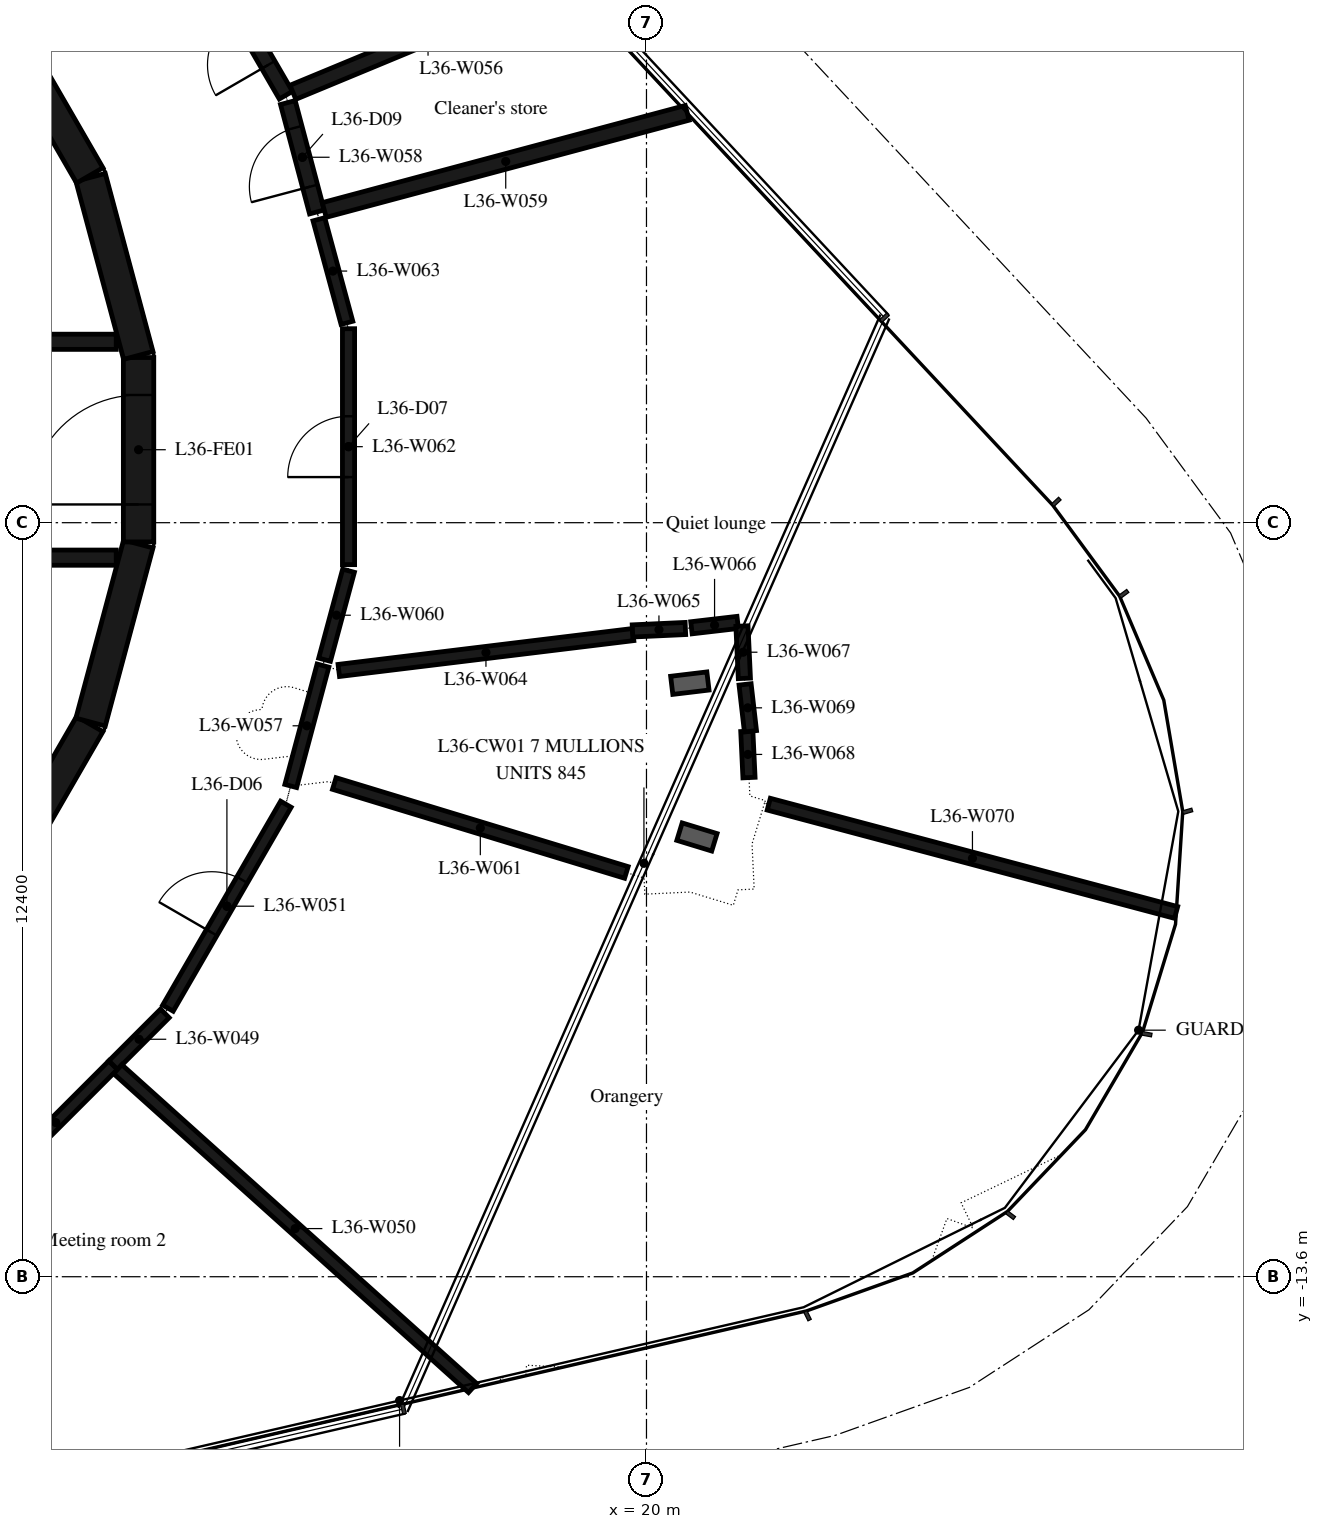
"""IFC4 building model, lengths in metres.
Left out: names, types, materials, properties, quantities, classifications, styles, units other than length and angle.
Written with IfcOpenShell. Run it as: python <this file> out.ifc"""

import sys

from ifc_helpers import new_model, si_unit, direction, frame, frame_2d, origin, place, context, subcontext, project, spatial, rectangle, extrude, element, fill, save


model = new_model("IFC4")
c1 = context("Model", 3, precision=1e-05, world=origin(), true_north=direction((0.0, 1.0)))
c2 = subcontext(c1, "Body", "Model", "MODEL_VIEW")
j1 = project(units=[si_unit("LENGTHUNIT", "METRE"), si_unit("PLANEANGLEUNIT", "RADIAN")], contexts=[c1])
p1 = place(None, origin())
s1 = spatial("IfcSite", under=j1, at=p1, CompositionType="ELEMENT")
p2 = place(p1, origin())
s2 = spatial("IfcBuilding", under=s1, at=p2, CompositionType="ELEMENT")
p3 = place(p2, frame((0.0, 0.0, 144.9)))
s3 = spatial("IfcBuildingStorey", under=s2, at=p3, CompositionType="ELEMENT", Elevation=144.9)
for number, where, z_axis, x_axis in (
    (1, (9.329, -7.137, 0.0), (0.0, 0.0, 1.0), (0.5, 0.866, 0.0)),
    (2, (10.858, -4.479, 0.0), (0.0, 0.0, 1.0), (0.259, 0.966, 0.0)),
):
    element("IfcWall", number, at=place(p3, frame(where, z_axis=z_axis, x_axis=x_axis)), inside=s3, PredefinedType="SHEAR", context=c2, shape_type="SweptSolid", body=[
        extrude(rectangle(XDim=3.033, YDim=0.5, at=frame_2d((1.516, 0.0))), origin(), (0.0, 0.0, 1.0), 6.35),
    ])
p4 = place(p3, frame((11.647, -1.516, 0.0), z_axis=(0.0, 0.0, 1.0), x_axis=(0.0, 1.0, 0.0)))
e3 = element("IfcWall", 3, at=p4, inside=s3, PredefinedType="SHEAR", context=c2, shape_type="SweptSolid", body=[
    extrude(rectangle(XDim=3.033, YDim=0.5, at=frame_2d((1.516, 0.0))), origin(), (0.0, 0.0, 1.0), 6.35),
])
p5 = place(p4, frame((0.616, 0.0, 0.0)))
e4 = element("IfcOpeningElement", 4, at=p5, cuts=e3, PredefinedType="OPENING", context=c2, shape_type="SweptSolid", body=[
    extrude(rectangle(XDim=1.8, YDim=2.1, at=frame_2d((0.9, 1.05))), frame((0.0, 0.26, 0.0), z_axis=(0.0, -1.0, 0.0), x_axis=(1.0, 0.0, 0.0)), (0.0, 0.0, 1.0), 0.52),
])
for number, where, z_axis, x_axis in (
    (5, (11.643, 1.55, 0.0), (0.0, 0.0, 1.0), (-0.259, 0.966, 0.0)),
    (6, (10.845, 4.51, 0.0), (0.0, 0.0, 1.0), (-0.5, 0.866, 0.0)),
):
    element("IfcWall", number, at=place(p3, frame(where, z_axis=z_axis, x_axis=x_axis)), inside=s3, PredefinedType="SHEAR", context=c2, shape_type="SweptSolid", body=[
        extrude(rectangle(XDim=3.033, YDim=0.5, at=frame_2d((1.516, 0.0))), origin(), (0.0, 0.0, 1.0), 6.35),
    ])
p6 = place(p3, frame((3.35, 1.775, 0.0), z_axis=(0.0, 0.0, 1.0), x_axis=(1.0, 0.0, 0.0)))
e7 = element("IfcWall", 7, at=p6, inside=s3, PredefinedType="SHEAR", context=c2, shape_type="SweptSolid", body=[
    extrude(rectangle(XDim=7.93, YDim=0.25, at=frame_2d((3.965, 0.0))), origin(), (0.0, 0.0, 1.0), 6.35),
])
p7 = place(p6, frame((0.35, 0.0, 0.0)))
e8 = element("IfcOpeningElement", 8, at=p7, cuts=e7, PredefinedType="OPENING", context=c2, shape_type="SweptSolid", body=[
    extrude(rectangle(XDim=1.2, YDim=2.4, at=frame_2d((0.6, 1.2))), frame((0.0, 0.135, 0.0), z_axis=(0.0, -1.0, 0.0), x_axis=(1.0, 0.0, 0.0)), (0.0, 0.0, 1.0), 0.27),
])
p8 = place(p6, frame((2.5, 0.0, 0.0)))
e9 = element("IfcOpeningElement", 9, at=p8, cuts=e7, PredefinedType="OPENING", context=c2, shape_type="SweptSolid", body=[
    extrude(rectangle(XDim=1.2, YDim=2.4, at=frame_2d((0.6, 1.2))), frame((0.0, 0.135, 0.0), z_axis=(0.0, -1.0, 0.0), x_axis=(1.0, 0.0, 0.0)), (0.0, 0.0, 1.0), 0.27),
])
p9 = place(p6, frame((4.8, 0.0, 0.0)))
e10 = element("IfcOpeningElement", 10, at=p9, cuts=e7, PredefinedType="OPENING", context=c2, shape_type="SweptSolid", body=[
    extrude(rectangle(XDim=0.9, YDim=2.1, at=frame_2d((0.45, 1.05))), frame((0.0, 0.135, 0.0), z_axis=(0.0, -1.0, 0.0), x_axis=(1.0, 0.0, 0.0)), (0.0, 0.0, 1.0), 0.27),
])
p10 = place(p3, frame((3.35, -1.775, 0.0), z_axis=(0.0, 0.0, 1.0), x_axis=(1.0, 0.0, 0.0)))
e11 = element("IfcWall", 11, at=p10, inside=s3, PredefinedType="SHEAR", context=c2, shape_type="SweptSolid", body=[
    extrude(rectangle(XDim=7.93, YDim=0.25, at=frame_2d((3.965, 0.0))), origin(), (0.0, 0.0, 1.0), 6.35),
])
p11 = place(p10, frame((0.4, 0.0, 0.0)))
e12 = element("IfcOpeningElement", 12, at=p11, cuts=e11, PredefinedType="OPENING", context=c2, shape_type="SweptSolid", body=[
    extrude(rectangle(XDim=1.1, YDim=2.4, at=frame_2d((0.55, 1.2))), frame((0.0, 0.135, 0.0), z_axis=(0.0, -1.0, 0.0), x_axis=(1.0, 0.0, 0.0)), (0.0, 0.0, 1.0), 0.27),
])
p12 = place(p10, frame((2.55, 0.0, 0.0)))
e13 = element("IfcOpeningElement", 13, at=p12, cuts=e11, PredefinedType="OPENING", context=c2, shape_type="SweptSolid", body=[
    extrude(rectangle(XDim=1.1, YDim=2.4, at=frame_2d((0.55, 1.2))), frame((0.0, 0.135, 0.0), z_axis=(0.0, -1.0, 0.0), x_axis=(1.0, 0.0, 0.0)), (0.0, 0.0, 1.0), 0.27),
])
p13 = place(p10, frame((4.7, 0.0, 0.0)))
e14 = element("IfcOpeningElement", 14, at=p13, cuts=e11, PredefinedType="OPENING", context=c2, shape_type="SweptSolid", body=[
    extrude(rectangle(XDim=1.1, YDim=2.4, at=frame_2d((0.55, 1.2))), frame((0.0, 0.135, 0.0), z_axis=(0.0, -1.0, 0.0), x_axis=(1.0, 0.0, 0.0)), (0.0, 0.0, 1.0), 0.27),
])
p14 = place(p3, frame((9.341, -12.009, 0.0), z_axis=(0.0, 0.0, 1.0), x_axis=(0.707106781187, 0.707106781187, 0.0)))
e15 = element("IfcWall", 15, at=p14, inside=s3, PredefinedType="PARTITIONING", context=c2, shape_type="SweptSolid", body=[
    extrude(rectangle(XDim=2.672, YDim=0.2, at=frame_2d((1.336, 0.0))), origin(), (0.0, 0.0, 1.0), 6.35),
])
p15 = place(p3, frame((11.23, -10.12, 0.0), z_axis=(0.0, 0.0, 1.0), x_axis=(0.707106781187, 0.707106781187, 0.0)))
e16 = element("IfcWall", 16, at=p15, inside=s3, PredefinedType="PARTITIONING", context=c2, shape_type="SweptSolid", body=[
    extrude(rectangle(XDim=1.202, YDim=0.2, at=frame_2d((0.601, 0.0))), origin(), (0.0, 0.0, 1.0), 6.35),
])
p16 = place(p3, frame((11.304, -10.187, 0.0), z_axis=(0.0, 0.0, 1.0), x_axis=(0.743847874898, -0.668348964995, 0.0)))
e17 = element("IfcWall", 17, at=p16, inside=s3, PredefinedType="PARTITIONING", context=c2, shape_type="SweptSolid", body=[
    extrude(rectangle(XDim=7.845, YDim=0.2, at=frame_2d((3.922, 0.0))), origin(), (0.0, 0.0, 1.0), 6.35),
])
p17 = place(p3, frame((12.13, -9.183, 0.0), z_axis=(0.0, 0.0, 1.0), x_axis=(0.500760497952, 0.865585884642, 0.0)))
e18 = element("IfcWall", 18, at=p17, inside=s3, PredefinedType="PARTITIONING", context=c2, shape_type="SweptSolid", body=[
    extrude(rectangle(XDim=3.874, YDim=0.2, at=frame_2d((1.937, 0.0))), origin(), (0.0, 0.0, 1.0), 6.35),
])
p18 = place(p17, frame((1.437, 0.0, 0.0)))
e19 = element("IfcOpeningElement", 19, at=p18, cuts=e18, PredefinedType="OPENING", context=c2, shape_type="SweptSolid", body=[
    extrude(rectangle(XDim=1.0, YDim=2.1, at=frame_2d((0.5, 1.05))), frame((0.0, 0.11, 0.0), z_axis=(0.0, -1.0, 0.0), x_axis=(1.0, 0.0, 0.0)), (0.0, 0.0, 1.0), 0.22),
])
p19 = place(p3, frame((14.07, 5.83, 0.0), z_axis=(0.0, 0.0, 1.0), x_axis=(-0.501416067615, 0.865206291666, 0.0)))
e20 = element("IfcWall", 20, at=p19, inside=s3, PredefinedType="PARTITIONING", context=c2, shape_type="SweptSolid", body=[
    extrude(rectangle(XDim=2.154, YDim=0.25, at=frame_2d((1.077, 0.0))), origin(), (0.0, 0.0, 1.0), 6.35),
])
p20 = place(p19, frame((0.577, 0.0, 0.0)))
e21 = element("IfcOpeningElement", 21, at=p20, cuts=e20, PredefinedType="OPENING", context=c2, shape_type="SweptSolid", body=[
    extrude(rectangle(XDim=1.0, YDim=2.1, at=frame_2d((0.5, 1.05))), frame((0.0, 0.135, 0.0), z_axis=(0.0, -1.0, 0.0), x_axis=(1.0, 0.0, 0.0)), (0.0, 0.0, 1.0), 0.27),
])
p21 = place(p3, frame((14.186, 5.878, 0.0), z_axis=(0.0, 0.0, 1.0), x_axis=(0.923795968244, 0.382885112085, 0.0)))
e22 = element("IfcWall", 22, at=p21, inside=s3, PredefinedType="PARTITIONING", context=c2, shape_type="SweptSolid", body=[
    extrude(rectangle(XDim=4.811, YDim=0.25, at=frame_2d((2.406, 0.0))), origin(), (0.0, 0.0, 1.0), 6.35),
])
p22 = place(p3, frame((14.15, -5.53, 0.0), z_axis=(0.0, 0.0, 1.0), x_axis=(0.258589222806, 0.965987377686, 0.0)))
e23 = element("IfcWall", 23, at=p22, inside=s3, PredefinedType="PARTITIONING", context=c2, shape_type="SweptSolid", body=[
    extrude(rectangle(XDim=2.05, YDim=0.2, at=frame_2d((1.025, 0.0))), origin(), (0.0, 0.0, 1.0), 6.35),
])
p23 = place(p3, frame((14.58, 3.91, 0.0), z_axis=(0.0, 0.0, 1.0), x_axis=(-0.256764718734, 0.966473941301, 0.0)))
e24 = element("IfcWall", 24, at=p23, inside=s3, PredefinedType="PARTITIONING", context=c2, shape_type="SweptSolid", body=[
    extrude(rectangle(XDim=1.862, YDim=0.25, at=frame_2d((0.931, 0.0))), origin(), (0.0, 0.0, 1.0), 6.35),
])
p24 = place(p23, frame((0.431, 0.0, 0.0)))
e25 = element("IfcOpeningElement", 25, at=p24, cuts=e24, PredefinedType="OPENING", context=c2, shape_type="SweptSolid", body=[
    extrude(rectangle(XDim=1.0, YDim=2.1, at=frame_2d((0.5, 1.05))), frame((0.0, 0.135, 0.0), z_axis=(0.0, -1.0, 0.0), x_axis=(1.0, 0.0, 0.0)), (0.0, 0.0, 1.0), 0.27),
])
p25 = place(p3, frame((14.701, 3.942, 0.0), z_axis=(0.0, 0.0, 1.0), x_axis=(0.965998462852, 0.258547809444, 0.0)))
e26 = element("IfcWall", 26, at=p25, inside=s3, PredefinedType="PARTITIONING", context=c2, shape_type="SweptSolid", body=[
    extrude(rectangle(XDim=6.179, YDim=0.25, at=frame_2d((3.09, 0.0))), origin(), (0.0, 0.0, 1.0), 6.35),
])
p26 = place(p3, frame((14.706, -3.453, 0.0), z_axis=(0.0, 0.0, 1.0), x_axis=(0.260008136588, 0.96560642547, 0.0)))
e27 = element("IfcWall", 27, at=p26, inside=s3, PredefinedType="PARTITIONING", context=c2, shape_type="SweptSolid", body=[
    extrude(rectangle(XDim=1.515, YDim=0.2, at=frame_2d((0.758, 0.0))), origin(), (0.0, 0.0, 1.0), 6.35),
])
p27 = place(p3, frame((14.866, -5.489, 0.0), z_axis=(0.0, 0.0, 1.0), x_axis=(0.956637955258, -0.291279629495, 0.0)))
e28 = element("IfcWall", 28, at=p27, inside=s3, PredefinedType="PARTITIONING", context=c2, shape_type="SweptSolid", body=[
    extrude(rectangle(XDim=5.021, YDim=0.2, at=frame_2d((2.511, 0.0))), origin(), (0.0, 0.0, 1.0), 6.35),
])
p28 = place(p3, frame((15.1, -1.89, 0.0), z_axis=(0.0, 0.0, 1.0), x_axis=(0.0, 1.0, 0.0)))
e29 = element("IfcWall", 29, at=p28, inside=s3, PredefinedType="PARTITIONING", context=c2, shape_type="SweptSolid", body=[
    extrude(rectangle(XDim=3.88, YDim=0.2, at=frame_2d((1.94, 0.0))), origin(), (0.0, 0.0, 1.0), 6.35),
])
p29 = place(p28, frame((1.44, 0.0, 0.0)))
e30 = element("IfcOpeningElement", 30, at=p29, cuts=e29, PredefinedType="OPENING", context=c2, shape_type="SweptSolid", body=[
    extrude(rectangle(XDim=1.0, YDim=2.1, at=frame_2d((0.5, 1.05))), frame((0.0, 0.11, 0.0), z_axis=(0.0, -1.0, 0.0), x_axis=(1.0, 0.0, 0.0)), (0.0, 0.0, 1.0), 0.22),
])
p30 = place(p3, frame((15.074, 2.086, 0.0), z_axis=(0.0, 0.0, 1.0), x_axis=(-0.261407417774, 0.965228554247, 0.0)))
e31 = element("IfcWall", 31, at=p30, inside=s3, PredefinedType="PARTITIONING", context=c2, shape_type="SweptSolid", body=[
    extrude(rectangle(XDim=1.764, YDim=0.2, at=frame_2d((0.882, 0.0))), origin(), (0.0, 0.0, 1.0), 6.35),
])
p31 = place(p3, frame((19.78, -3.04, 0.0), z_axis=(0.0, 0.0, 1.0), x_axis=(-0.992655999792, -0.120971344035, 0.0)))
e32 = element("IfcWall", 32, at=p31, inside=s3, PredefinedType="PARTITIONING", context=c2, shape_type="SweptSolid", body=[
    extrude(rectangle(XDim=4.876, YDim=0.2, at=frame_2d((2.438, 0.0))), origin(), (0.0, 0.0, 1.0), 6.35),
])
p32 = place(p3, frame((20.64, -2.94, 0.0), z_axis=(0.0, 0.0, 1.0), x_axis=(-0.998942362986, -0.045979945981, 0.0)))
e33 = element("IfcWall", 33, at=p32, inside=s3, PredefinedType="PARTITIONING", context=c2, shape_type="SweptSolid", body=[
    extrude(rectangle(XDim=0.871, YDim=0.2, at=frame_2d((0.436, 0.0))), origin(), (0.0, 0.0, 1.0), 6.35),
])
p33 = place(p3, frame((21.5, -2.84, 0.0), z_axis=(0.0, 0.0, 1.0), x_axis=(-0.993319282503, -0.11539845323, 0.0)))
e34 = element("IfcWall", 34, at=p33, inside=s3, PredefinedType="PARTITIONING", context=c2, shape_type="SweptSolid", body=[
    extrude(rectangle(XDim=0.766, YDim=0.2, at=frame_2d((0.383, 0.0))), origin(), (0.0, 0.0, 1.0), 6.35),
])
p34 = place(p3, frame((21.61, -3.76, 0.0), z_axis=(0.0, 0.0, 1.0), x_axis=(-0.046500877902, 0.998918249085, 0.0)))
e35 = element("IfcWall", 35, at=p34, inside=s3, PredefinedType="PARTITIONING", context=c2, shape_type="SweptSolid", body=[
    extrude(rectangle(XDim=0.861, YDim=0.2, at=frame_2d((0.431, 0.0))), origin(), (0.0, 0.0, 1.0), 6.35),
])
p35 = place(p3, frame((21.686, -5.392, 0.0), z_axis=(0.0, 0.0, 1.0), x_axis=(-0.04704813062, 0.998892623561, 0.0)))
e36 = element("IfcWall", 36, at=p35, inside=s3, PredefinedType="PARTITIONING", context=c2, shape_type="SweptSolid", body=[
    extrude(rectangle(XDim=0.763, YDim=0.2, at=frame_2d((0.381, 0.0))), origin(), (0.0, 0.0, 1.0), 6.35),
])
p36 = place(p3, frame((21.71, -4.63, 0.0), z_axis=(0.0, 0.0, 1.0), x_axis=(-0.114265663262, 0.993450229352, 0.0)))
e37 = element("IfcWall", 37, at=p36, inside=s3, PredefinedType="PARTITIONING", context=c2, shape_type="SweptSolid", body=[
    extrude(rectangle(XDim=0.776, YDim=0.2, at=frame_2d((0.388, 0.0))), origin(), (0.0, 0.0, 1.0), 6.35),
])
p37 = place(p3, frame((22.011, -5.829, 0.0), z_axis=(0.0, 0.0, 1.0), x_axis=(0.966417091156, -0.25697860985, 0.0)))
e38 = element("IfcWall", 38, at=p37, inside=s3, PredefinedType="PARTITIONING", context=c2, shape_type="SweptSolid", body=[
    extrude(rectangle(XDim=6.931, YDim=0.2, at=frame_2d((3.466, 0.0))), origin(), (0.0, 0.0, 1.0), 6.35),
])
p38 = place(p5, origin())
e39 = element("IfcDoor", 39, at=p38, inside=s3, OperationType="DOUBLE_DOOR_SINGLE_SWING", PredefinedType="DOOR", context=c2, shape_type="SweptSolid", body=[
    extrude(rectangle(XDim=1.8, YDim=2.1, at=frame_2d((0.9, 1.05))), frame((0.0, 0.025, 0.0), z_axis=(0.0, -1.0, 0.0), x_axis=(1.0, 0.0, 0.0)), (0.0, 0.0, 1.0), 0.05),
])
fill(e4, e39)
p39 = place(p18, origin())
e40 = element("IfcDoor", 40, at=p39, inside=s3, OperationType="SINGLE_SWING_LEFT", PredefinedType="DOOR", context=c2, shape_type="SweptSolid", body=[
    extrude(rectangle(XDim=1.0, YDim=2.1, at=frame_2d((0.5, 1.05))), frame((0.0, 0.025, 0.0), z_axis=(0.0, -1.0, 0.0), x_axis=(1.0, 0.0, 0.0)), (0.0, 0.0, 1.0), 0.05),
])
fill(e19, e40)
p40 = place(p29, origin())
e41 = element("IfcDoor", 41, at=p40, inside=s3, OperationType="SINGLE_SWING_LEFT", PredefinedType="DOOR", context=c2, shape_type="SweptSolid", body=[
    extrude(rectangle(XDim=1.0, YDim=2.1, at=frame_2d((0.5, 1.05))), frame((0.0, 0.025, 0.0), z_axis=(0.0, -1.0, 0.0), x_axis=(1.0, 0.0, 0.0)), (0.0, 0.0, 1.0), 0.05),
])
fill(e30, e41)
p41 = place(p24, origin())
e42 = element("IfcDoor", 42, at=p41, inside=s3, OperationType="SINGLE_SWING_LEFT", PredefinedType="DOOR", context=c2, shape_type="SweptSolid", body=[
    extrude(rectangle(XDim=1.0, YDim=2.1, at=frame_2d((0.5, 1.05))), frame((0.0, 0.025, 0.0), z_axis=(0.0, -1.0, 0.0), x_axis=(1.0, 0.0, 0.0)), (0.0, 0.0, 1.0), 0.05),
])
fill(e25, e42)
p42 = place(p20, origin())
e43 = element("IfcDoor", 43, at=p42, inside=s3, OperationType="SINGLE_SWING_LEFT", PredefinedType="DOOR", context=c2, shape_type="SweptSolid", body=[
    extrude(rectangle(XDim=1.0, YDim=2.1, at=frame_2d((0.5, 1.05))), frame((0.0, 0.025, 0.0), z_axis=(0.0, -1.0, 0.0), x_axis=(1.0, 0.0, 0.0)), (0.0, 0.0, 1.0), 0.05),
])
fill(e21, e43)
save(model, sys.argv[1])
